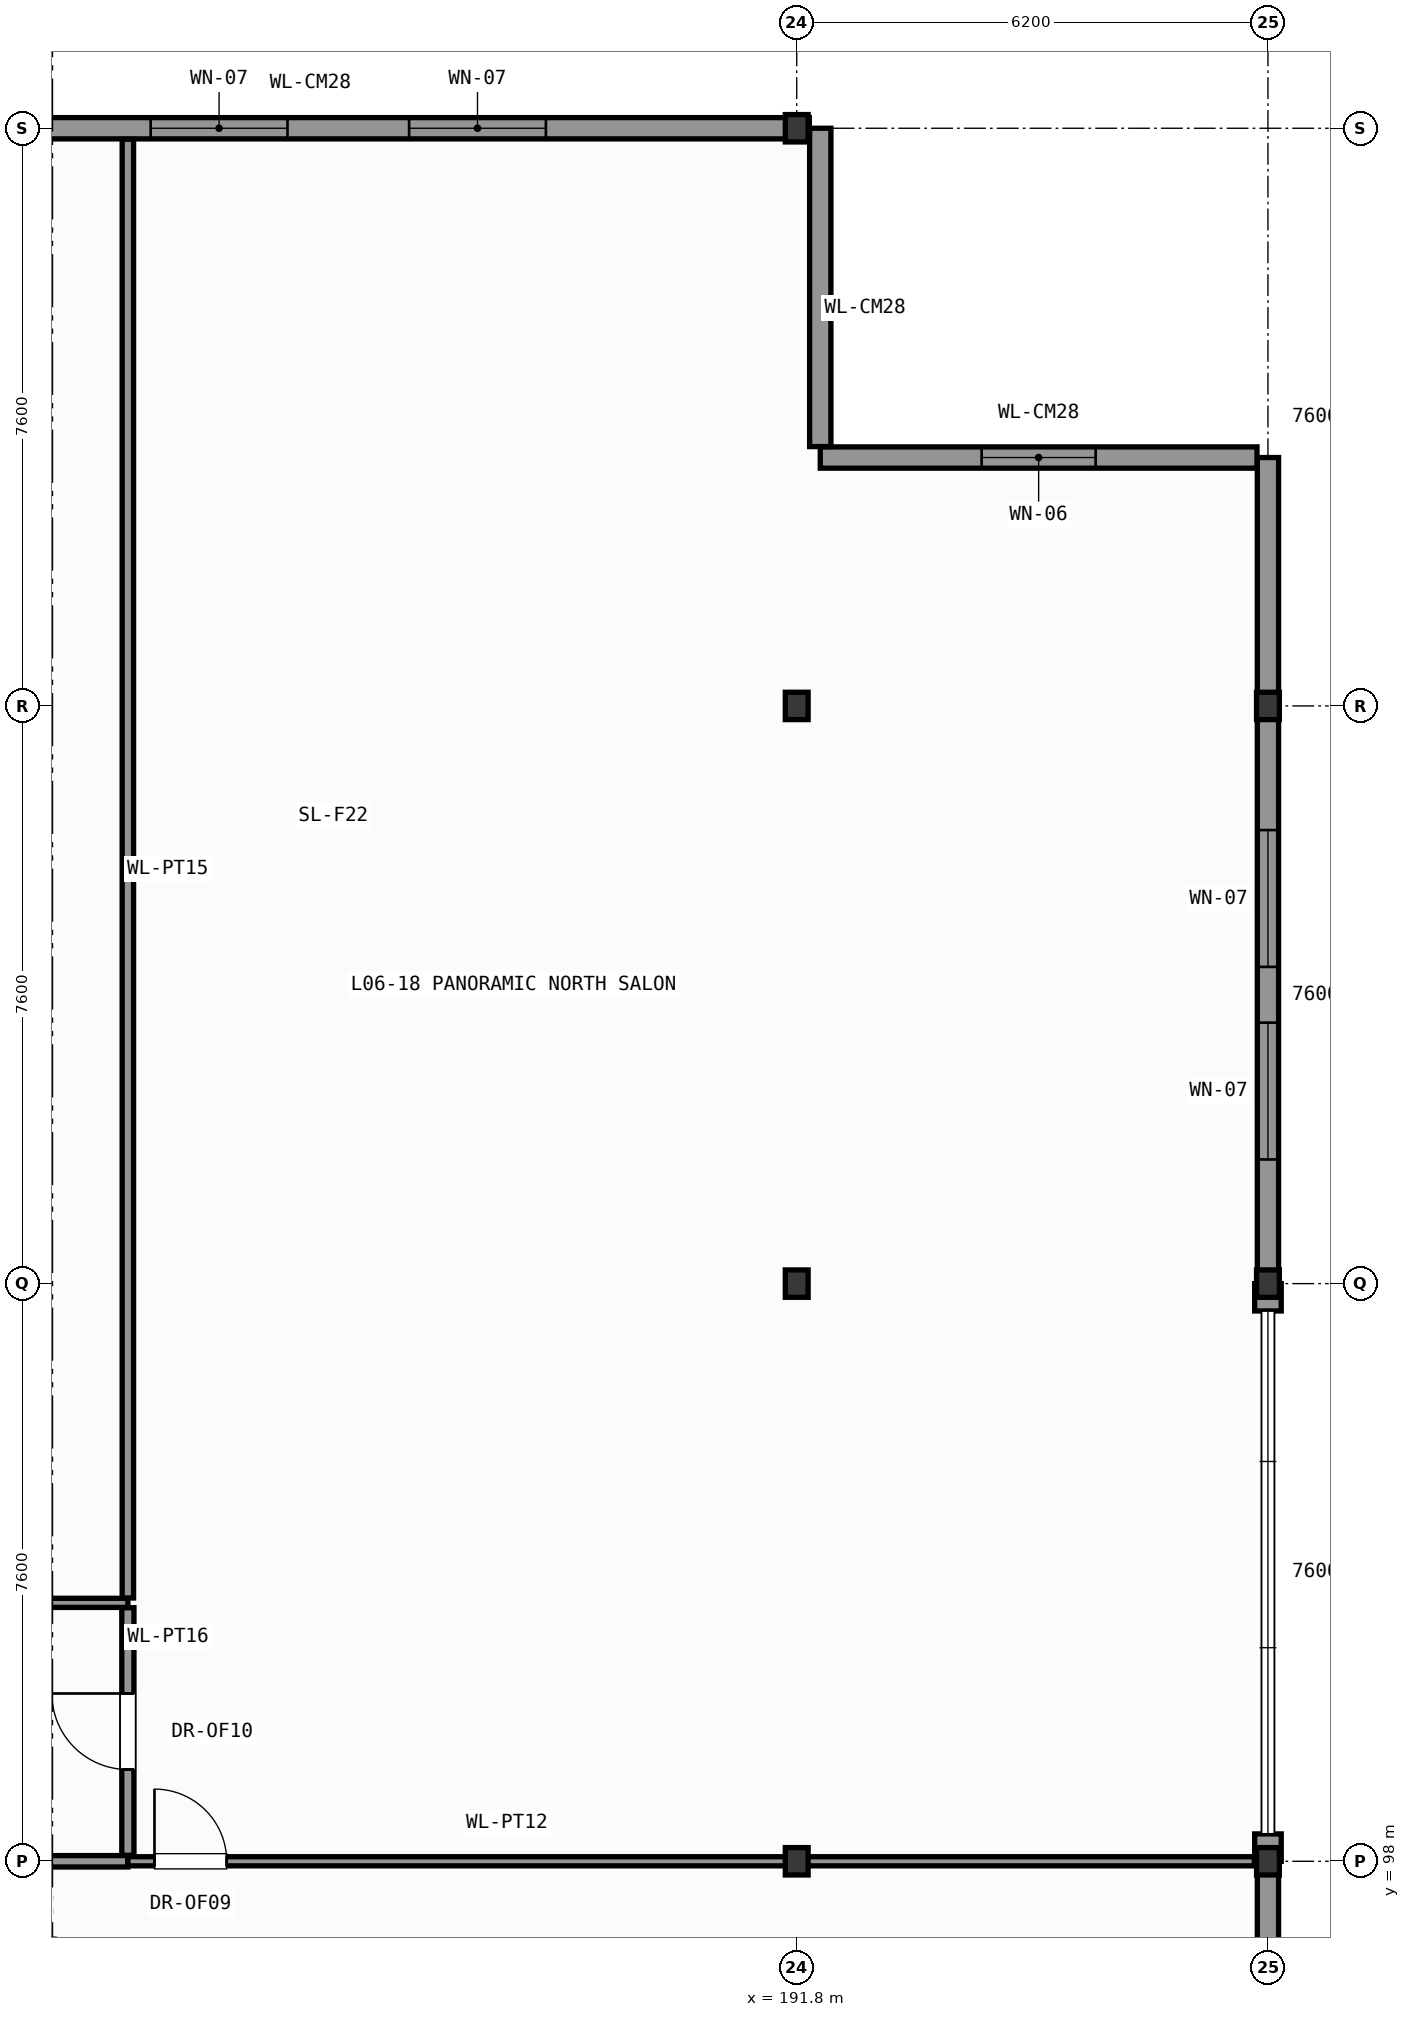
"""IFC4 building model, lengths in metres.
Left out: names, types, materials, properties, quantities, classifications, styles, units other than length and angle.
Written with IfcOpenShell. Run it as: python <this file> out.ifc"""

import sys

from ifc_helpers import new_model, si_unit, direction, frame, frame_2d, origin, origin_2d, place, context, subcontext, project, spatial, rectangle, i_section, extrude, element, fill, save


model = new_model("IFC4")
c1 = context("Model", 3, precision=1e-05, world=origin(), true_north=direction((0.0, 1.0)))
c2 = subcontext(c1, "Body", "Model", "MODEL_VIEW")
j1 = project(units=[si_unit("LENGTHUNIT", "METRE"), si_unit("PLANEANGLEUNIT", "RADIAN")], contexts=[c1])
p1 = place(None, origin())
s1 = spatial("IfcSite", under=j1, at=p1, CompositionType="ELEMENT")
p2 = place(p1, origin())
s2 = spatial("IfcBuilding", under=s1, at=p2, CompositionType="ELEMENT")
p3 = place(p2, frame((0.0, 0.0, 26.4)))
s3 = spatial("IfcBuildingStorey", under=s2, at=p3, CompositionType="ELEMENT", Elevation=26.4)
for number, where, z_axis, x_axis in (
    (1, (191.8, 98.0, 0.0), (0.0, 0.0, 1.0), (1.0, 0.0, 0.0)),
    (2, (191.8, 105.6, 0.0), (0.0, 0.0, 1.0), (1.0, 0.0, 0.0)),
    (3, (191.8, 113.2, 0.0), (0.0, 0.0, 1.0), (1.0, 0.0, 0.0)),
    (4, (191.8, 120.8, 0.0), (0.0, 0.0, 1.0), (1.0, 0.0, 0.0)),
    (5, (198.0, 98.0, 0.0), (0.0, 0.0, 1.0), (1.0, 0.0, 0.0)),
    (6, (198.0, 105.6, 0.0), (0.0, 0.0, 1.0), (1.0, 0.0, 0.0)),
    (7, (198.0, 113.2, 0.0), (0.0, 0.0, 1.0), (1.0, 0.0, 0.0)),
):
    element("IfcColumn", number, at=place(p3, frame(where, z_axis=z_axis, x_axis=x_axis)), inside=s3, PredefinedType="COLUMN", context=c2, shape_type="SweptSolid", body=[
        extrude(i_section(OverallWidth=0.3, OverallDepth=0.36, WebThickness=0.012, FlangeThickness=0.022, FilletRadius=0.027, at=origin_2d()), origin(), (0.0, 0.0, 1.0), 4.2),
    ])
p4 = place(p3, frame((198.0, 98.0, 0.0), z_axis=(0.0, 0.0, 1.0), x_axis=(0.0, -1.0, 0.0)))
e8 = element("IfcWall", 8, at=p4, inside=s3, PredefinedType="SOLIDWALL", context=c2, shape_type="SweptSolid", body=[
    extrude(rectangle(XDim=7.6, YDim=0.28, at=frame_2d((3.8, 0.0))), origin(), (0.0, 0.0, 1.0), 3.695),
])
p5 = place(p4, frame((1.483, 0.0, 0.95)))
e9 = element("IfcOpeningElement", 9, at=p5, cuts=e8, PredefinedType="OPENING", context=c2, shape_type="SweptSolid", body=[
    extrude(rectangle(XDim=2.1, YDim=2.35, at=frame_2d((1.05, 1.175))), frame((0.0, 0.15, 0.0), z_axis=(0.0, -1.0, 0.0), x_axis=(1.0, 0.0, 0.0)), (0.0, 0.0, 1.0), 0.3),
])
p6 = place(p4, frame((4.017, 0.0, 0.95)))
e10 = element("IfcOpeningElement", 10, at=p6, cuts=e8, PredefinedType="OPENING", context=c2, shape_type="SweptSolid", body=[
    extrude(rectangle(XDim=2.1, YDim=2.35, at=frame_2d((1.05, 1.175))), frame((0.0, 0.15, 0.0), z_axis=(0.0, -1.0, 0.0), x_axis=(1.0, 0.0, 0.0)), (0.0, 0.0, 1.0), 0.3),
])
for number, where, z_axis, x_axis in (
    (11, (198.0, 98.0, 0.0), (0.0, 0.0, 1.0), (0.0, 1.0, 0.0)),
    (12, (198.0, 105.24, 0.0), (0.0, 0.0, 1.0), (0.0, 1.0, 0.0)),
):
    element("IfcWall", number, at=place(p3, frame(where, z_axis=z_axis, x_axis=x_axis)), inside=s3, PredefinedType="SOLIDWALL", context=c2, shape_type="SweptSolid", body=[
        extrude(rectangle(XDim=0.36, YDim=0.35, at=frame_2d((0.18, 0.0))), origin(), (0.0, 0.0, 1.0), 3.695),
    ])
p7 = place(p3, frame((198.0, 113.2, 0.0), z_axis=(0.0, 0.0, 1.0), x_axis=(0.0, -1.0, 0.0)))
e13 = element("IfcWall", 13, at=p7, inside=s3, PredefinedType="SOLIDWALL", context=c2, shape_type="SweptSolid", body=[
    extrude(rectangle(XDim=7.6, YDim=0.28, at=frame_2d((3.8, 0.0))), origin(), (0.0, 0.0, 1.0), 3.695),
])
p8 = place(p7, frame((1.633, 0.0, 0.95)))
e14 = element("IfcOpeningElement", 14, at=p8, cuts=e13, PredefinedType="OPENING", context=c2, shape_type="SweptSolid", body=[
    extrude(rectangle(XDim=1.8, YDim=2.35, at=frame_2d((0.9, 1.175))), frame((0.0, 0.15, 0.0), z_axis=(0.0, -1.0, 0.0), x_axis=(1.0, 0.0, 0.0)), (0.0, 0.0, 1.0), 0.3),
])
p9 = place(p7, frame((4.167, 0.0, 0.95)))
e15 = element("IfcOpeningElement", 15, at=p9, cuts=e13, PredefinedType="OPENING", context=c2, shape_type="SweptSolid", body=[
    extrude(rectangle(XDim=1.8, YDim=2.35, at=frame_2d((0.9, 1.175))), frame((0.0, 0.15, 0.0), z_axis=(0.0, -1.0, 0.0), x_axis=(1.0, 0.0, 0.0)), (0.0, 0.0, 1.0), 0.3),
])
p10 = place(p3, frame((198.0, 116.468, 0.0), z_axis=(0.0, 0.0, 1.0), x_axis=(0.0, -1.0, 0.0)))
e16 = element("IfcWall", 16, at=p10, inside=s3, PredefinedType="SOLIDWALL", context=c2, shape_type="SweptSolid", body=[
    extrude(rectangle(XDim=3.268, YDim=0.28, at=frame_2d((1.634, 0.0))), origin(), (0.0, 0.0, 1.0), 4.0),
])
p11 = place(p3, frame((192.11, 116.468, 0.0), z_axis=(0.0, 0.0, 1.0), x_axis=(1.0, 0.0, 0.0)))
e17 = element("IfcWall", 17, at=p11, inside=s3, PredefinedType="SOLIDWALL", context=c2, shape_type="SweptSolid", body=[
    extrude(rectangle(XDim=5.746, YDim=0.28, at=frame_2d((2.873, 0.0))), origin(), (0.0, 0.0, 1.0), 4.0),
])
p12 = place(p11, frame((2.123, 0.0, 0.95)))
e18 = element("IfcOpeningElement", 18, at=p12, cuts=e17, PredefinedType="OPENING", context=c2, shape_type="SweptSolid", body=[
    extrude(rectangle(XDim=1.5, YDim=2.4, at=frame_2d((0.75, 1.2))), frame((0.0, 0.15, 0.0), z_axis=(0.0, -1.0, 0.0), x_axis=(1.0, 0.0, 0.0)), (0.0, 0.0, 1.0), 0.3),
])
p13 = place(p3, frame((192.11, 120.8, 0.0), z_axis=(0.0, 0.0, 1.0), x_axis=(0.0, -1.0, 0.0)))
e19 = element("IfcWall", 19, at=p13, inside=s3, PredefinedType="SOLIDWALL", context=c2, shape_type="SweptSolid", body=[
    extrude(rectangle(XDim=4.188, YDim=0.28, at=frame_2d((2.094, 0.0))), origin(), (0.0, 0.0, 1.0), 3.695),
])
p14 = place(p3, frame((179.0, 120.8, 0.0), z_axis=(0.0, 0.0, 1.0), x_axis=(1.0, 0.0, 0.0)))
e20 = element("IfcWall", 20, at=p14, inside=s3, PredefinedType="SOLIDWALL", context=c2, shape_type="SweptSolid", body=[
    extrude(rectangle(XDim=12.966, YDim=0.28, at=frame_2d((6.483, 0.0))), origin(), (0.0, 0.0, 1.0), 3.435),
])
p15 = place(p14, frame((4.3, 0.0, 0.95)))
e21 = element("IfcOpeningElement", 21, at=p15, cuts=e20, PredefinedType="OPENING", context=c2, shape_type="SweptSolid", body=[
    extrude(rectangle(XDim=1.8, YDim=2.09, at=frame_2d((0.9, 1.045))), frame((0.0, 0.15, 0.0), z_axis=(0.0, -1.0, 0.0), x_axis=(1.0, 0.0, 0.0)), (0.0, 0.0, 1.0), 0.3),
])
p16 = place(p14, frame((7.7, 0.0, 0.95)))
e22 = element("IfcOpeningElement", 22, at=p16, cuts=e20, PredefinedType="OPENING", context=c2, shape_type="SweptSolid", body=[
    extrude(rectangle(XDim=1.8, YDim=2.09, at=frame_2d((0.9, 1.045))), frame((0.0, 0.15, 0.0), z_axis=(0.0, -1.0, 0.0), x_axis=(1.0, 0.0, 0.0)), (0.0, 0.0, 1.0), 0.3),
])
p17 = place(p3, frame((179.884, 98.0, 0.0), z_axis=(0.0, 0.0, 1.0), x_axis=(1.0, 0.0, 0.0)))
e23 = element("IfcWall", 23, at=p17, inside=s3, PredefinedType="PARTITIONING", context=c2, shape_type="SweptSolid", body=[
    extrude(rectangle(XDim=3.116, YDim=0.15, at=frame_2d((1.558, 0.0))), origin(), (0.0, 0.0, 1.0), 3.435),
])
p18 = place(p17, frame((1.058, 0.0, 0.0)))
e24 = element("IfcOpeningElement", 24, at=p18, cuts=e23, PredefinedType="OPENING", context=c2, shape_type="SweptSolid", body=[
    extrude(rectangle(XDim=1.0, YDim=2.15, at=frame_2d((0.5, 1.075))), frame((0.0, 0.085, 0.0), z_axis=(0.0, -1.0, 0.0), x_axis=(1.0, 0.0, 0.0)), (0.0, 0.0, 1.0), 0.17),
])
p19 = place(p3, frame((183.0, 98.0, 0.0), z_axis=(0.0, 0.0, 1.0), x_axis=(1.0, 0.0, 0.0)))
e25 = element("IfcWall", 25, at=p19, inside=s3, PredefinedType="PARTITIONING", context=c2, shape_type="SweptSolid", body=[
    extrude(rectangle(XDim=14.821, YDim=0.12, at=frame_2d((7.411, 0.0))), origin(), (0.0, 0.0, 1.0), 3.335),
])
p20 = place(p19, frame((0.35, 0.0, 0.0)))
e26 = element("IfcOpeningElement", 26, at=p20, cuts=e25, PredefinedType="OPENING", context=c2, shape_type="SweptSolid", body=[
    extrude(rectangle(XDim=0.95, YDim=2.1, at=frame_2d((0.475, 1.05))), frame((0.0, 0.07, 0.0), z_axis=(0.0, -1.0, 0.0), x_axis=(1.0, 0.0, 0.0)), (0.0, 0.0, 1.0), 0.14),
])
p21 = place(p3, frame((170.479, 101.4, 0.0), z_axis=(0.0, 0.0, 1.0), x_axis=(1.0, 0.0, 0.0)))
e27 = element("IfcWall", 27, at=p21, inside=s3, PredefinedType="PARTITIONING", context=c2, shape_type="SweptSolid", body=[
    extrude(rectangle(XDim=12.521, YDim=0.12, at=frame_2d((6.26, 0.0))), origin(), (0.0, 0.0, 1.0), 4.0),
])
p22 = place(p21, frame((5.535, 0.0, 0.0)))
e28 = element("IfcOpeningElement", 28, at=p22, cuts=e27, PredefinedType="OPENING", context=c2, shape_type="SweptSolid", body=[
    extrude(rectangle(XDim=1.45, YDim=2.35, at=frame_2d((0.725, 1.175))), frame((0.0, 0.07, 0.0), z_axis=(0.0, -1.0, 0.0), x_axis=(1.0, 0.0, 0.0)), (0.0, 0.0, 1.0), 0.14),
])
p23 = place(p3, frame((183.0, 98.079, 0.0), z_axis=(0.0, 0.0, 1.0), x_axis=(0.0, 1.0, 0.0)))
e29 = element("IfcWall", 29, at=p23, inside=s3, PredefinedType="PARTITIONING", context=c2, shape_type="SweptSolid", body=[
    extrude(rectangle(XDim=3.257, YDim=0.16, at=frame_2d((1.628, 0.0))), origin(), (0.0, 0.0, 1.0), 4.0),
])
p24 = place(p23, frame((1.128, 0.0, 0.0)))
e30 = element("IfcOpeningElement", 30, at=p24, cuts=e29, PredefinedType="OPENING", context=c2, shape_type="SweptSolid", body=[
    extrude(rectangle(XDim=1.0, YDim=2.15, at=frame_2d((0.5, 1.075))), frame((0.0, 0.09, 0.0), z_axis=(0.0, -1.0, 0.0), x_axis=(1.0, 0.0, 0.0)), (0.0, 0.0, 1.0), 0.18),
])
p25 = place(p3, frame((183.0, 101.464, 0.0), z_axis=(0.0, 0.0, 1.0), x_axis=(0.0, 1.0, 0.0)))
e31 = element("IfcWall", 31, at=p25, inside=s3, PredefinedType="PARTITIONING", context=c2, shape_type="SweptSolid", body=[
    extrude(rectangle(XDim=19.192, YDim=0.15, at=frame_2d((9.596, 0.0))), origin(), (0.0, 0.0, 1.0), 4.0),
])
p26 = place(p8, origin())
e32 = element("IfcWindow", 32, at=p26, inside=s3, PartitioningType="SINGLE_PANEL", PredefinedType="WINDOW", context=c2, shape_type="SweptSolid", body=[
    extrude(rectangle(XDim=1.8, YDim=2.35, at=frame_2d((0.9, 1.175))), frame((0.0, 0.03, 0.0), z_axis=(0.0, -1.0, 0.0), x_axis=(1.0, 0.0, 0.0)), (0.0, 0.0, 1.0), 0.06),
])
fill(e14, e32)
p27 = place(p9, origin())
e33 = element("IfcWindow", 33, at=p27, inside=s3, PartitioningType="SINGLE_PANEL", PredefinedType="WINDOW", context=c2, shape_type="SweptSolid", body=[
    extrude(rectangle(XDim=1.8, YDim=2.35, at=frame_2d((0.9, 1.175))), frame((0.0, 0.03, 0.0), z_axis=(0.0, -1.0, 0.0), x_axis=(1.0, 0.0, 0.0)), (0.0, 0.0, 1.0), 0.06),
])
fill(e15, e33)
p28 = place(p12, origin())
e34 = element("IfcWindow", 34, at=p28, inside=s3, PartitioningType="SINGLE_PANEL", PredefinedType="WINDOW", context=c2, shape_type="SweptSolid", body=[
    extrude(rectangle(XDim=1.5, YDim=2.4, at=frame_2d((0.75, 1.2))), frame((0.0, 0.03, 0.0), z_axis=(0.0, -1.0, 0.0), x_axis=(1.0, 0.0, 0.0)), (0.0, 0.0, 1.0), 0.06),
])
fill(e18, e34)
p29 = place(p15, origin())
e35 = element("IfcWindow", 35, at=p29, inside=s3, PartitioningType="SINGLE_PANEL", PredefinedType="WINDOW", context=c2, shape_type="SweptSolid", body=[
    extrude(rectangle(XDim=1.8, YDim=2.09, at=frame_2d((0.9, 1.045))), frame((0.0, 0.03, 0.0), z_axis=(0.0, -1.0, 0.0), x_axis=(1.0, 0.0, 0.0)), (0.0, 0.0, 1.0), 0.06),
])
fill(e21, e35)
p30 = place(p16, origin())
e36 = element("IfcWindow", 36, at=p30, inside=s3, PartitioningType="SINGLE_PANEL", PredefinedType="WINDOW", context=c2, shape_type="SweptSolid", body=[
    extrude(rectangle(XDim=1.8, YDim=2.09, at=frame_2d((0.9, 1.045))), frame((0.0, 0.03, 0.0), z_axis=(0.0, -1.0, 0.0), x_axis=(1.0, 0.0, 0.0)), (0.0, 0.0, 1.0), 0.06),
])
fill(e22, e36)
p31 = place(p20, origin())
e37 = element("IfcDoor", 37, at=p31, inside=s3, OperationType="SINGLE_SWING_LEFT", PredefinedType="DOOR", context=c2, shape_type="SweptSolid", body=[
    extrude(rectangle(XDim=0.95, YDim=2.1, at=frame_2d((0.475, 1.05))), frame((0.0, 0.025, 0.0), z_axis=(0.0, -1.0, 0.0), x_axis=(1.0, 0.0, 0.0)), (0.0, 0.0, 1.0), 0.05),
])
fill(e26, e37)
p32 = place(p24, origin())
e38 = element("IfcDoor", 38, at=p32, inside=s3, OperationType="SINGLE_SWING_RIGHT", PredefinedType="DOOR", context=c2, shape_type="SweptSolid", body=[
    extrude(rectangle(XDim=1.0, YDim=2.15, at=frame_2d((0.5, 1.075))), frame((0.0, 0.025, 0.0), z_axis=(0.0, -1.0, 0.0), x_axis=(1.0, 0.0, 0.0)), (0.0, 0.0, 1.0), 0.05),
])
fill(e30, e38)
save(model, sys.argv[1])
